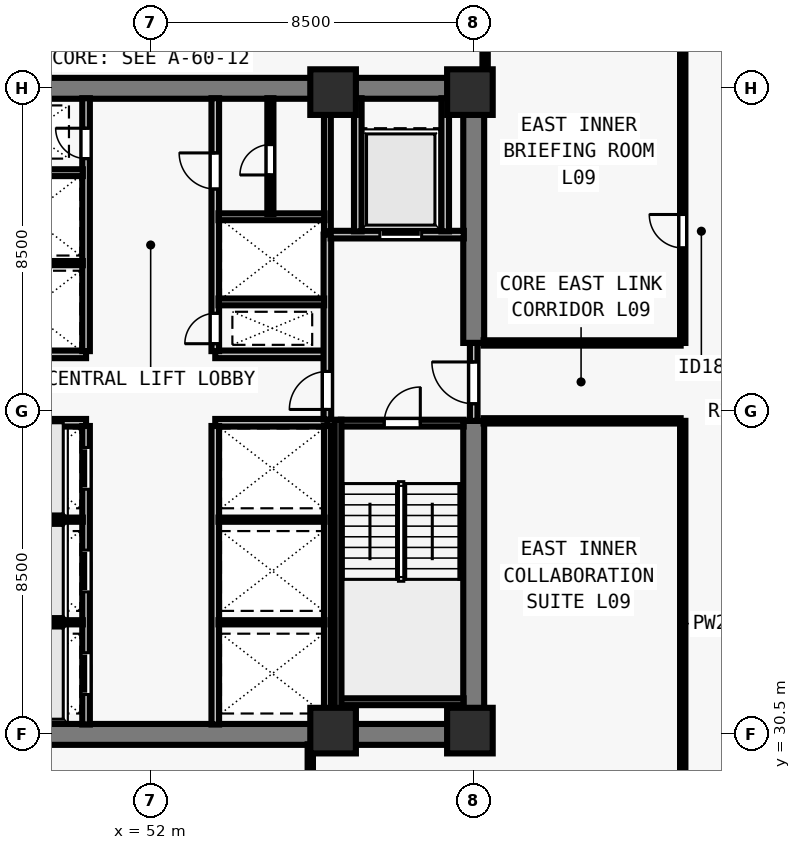
"""IFC4 building model, lengths in metres.
Left out: names, types, materials, properties, quantities, classifications, styles, units other than length and angle.
Written with IfcOpenShell. Run it as: python <this file> out.ifc"""

import sys

from ifc_helpers import new_model, si_unit, direction, frame, frame_2d, origin, origin_2d, place, context, subcontext, project, spatial, rectangle, extrude, element, fill, save


model = new_model("IFC4")
c1 = context("Model", 3, precision=1e-05, world=origin(), true_north=direction((0.0, 1.0)))
c2 = subcontext(c1, "Body", "Model", "MODEL_VIEW")
j1 = project(units=[si_unit("LENGTHUNIT", "METRE"), si_unit("PLANEANGLEUNIT", "RADIAN")], contexts=[c1])
p1 = place(None, origin())
s1 = spatial("IfcSite", under=j1, at=p1, CompositionType="ELEMENT")
p2 = place(p1, origin())
s2 = spatial("IfcBuilding", under=s1, at=p2, CompositionType="ELEMENT")
p3 = place(p2, frame((0.0, 0.0, 37.5)))
s3 = spatial("IfcBuildingStorey", under=s2, at=p3, CompositionType="ELEMENT", Elevation=37.5)
for number, where, z_axis, x_axis in (
    (1, (56.8, 30.6, 0.0), (0.0, 0.0, 1.0), (1.0, 0.0, 0.0)),
    (2, (60.4, 30.6, 0.0), (0.0, 0.0, 1.0), (1.0, 0.0, 0.0)),
    (3, (56.8, 47.4, 0.0), (0.0, 0.0, 1.0), (1.0, 0.0, 0.0)),
    (4, (60.4, 47.4, 0.0), (0.0, 0.0, 1.0), (1.0, 0.0, 0.0)),
):
    element("IfcColumn", number, at=place(p3, frame(where, z_axis=z_axis, x_axis=x_axis)), inside=s3, PredefinedType="COLUMN", context=c2, shape_type="SweptSolid", body=[
        extrude(rectangle(XDim=1.2, YDim=1.2, at=origin_2d()), origin(), (0.0, 0.0, 1.0), 3.5),
    ])
for number, where, z_axis, x_axis in (
    (5, (43.225, 30.5, 0.0), (0.0, 0.0, 1.0), (1.0, 0.0, 0.0)),
    (6, (43.225, 47.5, 0.0), (0.0, 0.0, 1.0), (1.0, 0.0, 0.0)),
):
    element("IfcWall", number, at=place(p3, frame(where, z_axis=z_axis, x_axis=x_axis)), inside=s3, PredefinedType="SHEAR", context=c2, shape_type="SweptSolid", body=[
        extrude(rectangle(XDim=17.55, YDim=0.55, at=frame_2d((8.775, 0.0))), origin(), (0.0, 0.0, 1.0), 3.28),
    ])
p4 = place(p3, frame((60.5, 30.765, 0.0), z_axis=(0.0, 0.0, 1.0), x_axis=(0.0, 1.0, 0.0)))
e7 = element("IfcWall", 7, at=p4, inside=s3, PredefinedType="SHEAR", context=c2, shape_type="SweptSolid", body=[
    extrude(rectangle(XDim=7.985, YDim=0.55, at=frame_2d((3.993, 0.0))), origin(), (0.0, 0.0, 1.0), 3.28),
])
p5 = place(p3, frame((60.5, 40.8, 0.0), z_axis=(0.0, 0.0, 1.0), x_axis=(0.0, 1.0, 0.0)))
e8 = element("IfcWall", 8, at=p5, inside=s3, PredefinedType="SHEAR", context=c2, shape_type="SweptSolid", body=[
    extrude(rectangle(XDim=6.435, YDim=0.55, at=frame_2d((3.218, 0.0))), origin(), (0.0, 0.0, 1.0), 3.28),
])
for number, where, z_axis, x_axis in (
    (9, (47.35, 38.7, 0.0), (0.0, 0.0, 1.0), (1.0, 0.0, 0.0)),
    (10, (47.35, 40.5, 0.0), (0.0, 0.0, 1.0), (1.0, 0.0, 0.0)),
    (11, (53.7, 38.7, 0.0), (0.0, 0.0, 1.0), (1.0, 0.0, 0.0)),
    (12, (53.7, 40.5, 0.0), (0.0, 0.0, 1.0), (1.0, 0.0, 0.0)),
):
    element("IfcWall", number, at=place(p3, frame(where, z_axis=z_axis, x_axis=x_axis)), inside=s3, PredefinedType="SOLIDWALL", context=c2, shape_type="SweptSolid", body=[
        extrude(rectangle(XDim=2.95, YDim=0.2, at=frame_2d((1.475, 0.0))), origin(), (0.0, 0.0, 1.0), 3.28),
    ])
p6 = place(p3, frame((50.3, 30.76, 0.0), z_axis=(0.0, 0.0, 1.0), x_axis=(0.0, 1.0, 0.0)))
e13 = element("IfcWall", 13, at=p6, inside=s3, PredefinedType="SOLIDWALL", context=c2, shape_type="SweptSolid", body=[
    extrude(rectangle(XDim=7.855, YDim=0.2, at=frame_2d((3.927, 0.0))), origin(), (0.0, 0.0, 1.0), 3.28),
])
p7 = place(p6, frame((0.79, 0.0, 0.0)))
e14 = element("IfcOpeningElement", 14, at=p7, cuts=e13, PredefinedType="OPENING", context=c2, shape_type="SweptSolid", body=[
    extrude(rectangle(XDim=1.1, YDim=2.2, at=frame_2d((0.55, 1.1))), frame((0.0, 0.11, 0.0), z_axis=(0.0, -1.0, 0.0), x_axis=(1.0, 0.0, 0.0)), (0.0, 0.0, 1.0), 0.22),
])
p8 = place(p6, frame((3.49, 0.0, 0.0)))
e15 = element("IfcOpeningElement", 15, at=p8, cuts=e13, PredefinedType="OPENING", context=c2, shape_type="SweptSolid", body=[
    extrude(rectangle(XDim=1.1, YDim=2.2, at=frame_2d((0.55, 1.1))), frame((0.0, 0.11, 0.0), z_axis=(0.0, -1.0, 0.0), x_axis=(1.0, 0.0, 0.0)), (0.0, 0.0, 1.0), 0.22),
])
p9 = place(p6, frame((6.19, 0.0, 0.0)))
e16 = element("IfcOpeningElement", 16, at=p9, cuts=e13, PredefinedType="OPENING", context=c2, shape_type="SweptSolid", body=[
    extrude(rectangle(XDim=1.1, YDim=2.2, at=frame_2d((0.55, 1.1))), frame((0.0, 0.11, 0.0), z_axis=(0.0, -1.0, 0.0), x_axis=(1.0, 0.0, 0.0)), (0.0, 0.0, 1.0), 0.22),
])
p10 = place(p3, frame((53.7, 30.76, 0.0), z_axis=(0.0, 0.0, 1.0), x_axis=(0.0, 1.0, 0.0)))
e17 = element("IfcWall", 17, at=p10, inside=s3, PredefinedType="SOLIDWALL", context=c2, shape_type="SweptSolid", body=[
    extrude(rectangle(XDim=7.855, YDim=0.2, at=frame_2d((3.927, 0.0))), origin(), (0.0, 0.0, 1.0), 3.28),
])
p11 = place(p3, frame((50.3, 40.585, 0.0), z_axis=(0.0, 0.0, 1.0), x_axis=(0.0, 1.0, 0.0)))
e18 = element("IfcWall", 18, at=p11, inside=s3, PredefinedType="SOLIDWALL", context=c2, shape_type="SweptSolid", body=[
    extrude(rectangle(XDim=6.655, YDim=0.2, at=frame_2d((3.328, 0.0))), origin(), (0.0, 0.0, 1.0), 3.28),
])
p12 = place(p11, frame((5.065, 0.0, 0.0)))
e19 = element("IfcOpeningElement", 19, at=p12, cuts=e18, PredefinedType="OPENING", context=c2, shape_type="SweptSolid", body=[
    extrude(rectangle(XDim=0.8, YDim=2.08, at=frame_2d((0.4, 1.04))), frame((0.0, 0.11, 0.0), z_axis=(0.0, -1.0, 0.0), x_axis=(1.0, 0.0, 0.0)), (0.0, 0.0, 1.0), 0.22),
])
p13 = place(p3, frame((53.7, 40.585, 0.0), z_axis=(0.0, 0.0, 1.0), x_axis=(0.0, 1.0, 0.0)))
e20 = element("IfcWall", 20, at=p13, inside=s3, PredefinedType="SOLIDWALL", context=c2, shape_type="SweptSolid", body=[
    extrude(rectangle(XDim=6.655, YDim=0.2, at=frame_2d((3.328, 0.0))), origin(), (0.0, 0.0, 1.0), 3.28),
])
p14 = place(p13, frame((0.195, 0.0, 0.0)))
e21 = element("IfcOpeningElement", 21, at=p14, cuts=e20, PredefinedType="OPENING", context=c2, shape_type="SweptSolid", body=[
    extrude(rectangle(XDim=0.8, YDim=2.08, at=frame_2d((0.4, 1.04))), frame((0.0, 0.11, 0.0), z_axis=(0.0, -1.0, 0.0), x_axis=(1.0, 0.0, 0.0)), (0.0, 0.0, 1.0), 0.22),
])
p15 = place(p13, frame((4.265, 0.0, 0.0)))
e22 = element("IfcOpeningElement", 22, at=p15, cuts=e20, PredefinedType="OPENING", context=c2, shape_type="SweptSolid", body=[
    extrude(rectangle(XDim=0.95, YDim=2.12, at=frame_2d((0.475, 1.06))), frame((0.0, 0.11, 0.0), z_axis=(0.0, -1.0, 0.0), x_axis=(1.0, 0.0, 0.0)), (0.0, 0.0, 1.0), 0.22),
])
p16 = place(p3, frame((60.5, 38.75, 0.0), z_axis=(0.0, 0.0, 1.0), x_axis=(0.0, 1.0, 0.0)))
e23 = element("IfcWall", 23, at=p16, inside=s3, PredefinedType="SOLIDWALL", context=c2, shape_type="SweptSolid", body=[
    extrude(rectangle(XDim=2.05, YDim=0.2, at=frame_2d((1.025, 0.0))), origin(), (0.0, 0.0, 1.0), 3.28),
])
p17 = place(p16, frame((0.45, 0.0, 0.0)))
e24 = element("IfcOpeningElement", 24, at=p17, cuts=e23, PredefinedType="OPENING", context=c2, shape_type="SweptSolid", body=[
    extrude(rectangle(XDim=1.1, YDim=2.15, at=frame_2d((0.55, 1.075))), frame((0.0, 0.11, 0.0), z_axis=(0.0, -1.0, 0.0), x_axis=(1.0, 0.0, 0.0)), (0.0, 0.0, 1.0), 0.22),
])
p18 = place(p3, frame((56.65, 38.785, 0.0), z_axis=(0.0, 0.0, 1.0), x_axis=(0.0, 1.0, 0.0)))
e25 = element("IfcWall", 25, at=p18, inside=s3, PredefinedType="SOLIDWALL", context=c2, shape_type="SweptSolid", body=[
    extrude(rectangle(XDim=4.865, YDim=0.2, at=frame_2d((2.433, 0.0))), origin(), (0.0, 0.0, 1.0), 3.28),
])
p19 = place(p18, frame((0.265, 0.0, 0.0)))
e26 = element("IfcOpeningElement", 26, at=p19, cuts=e25, PredefinedType="OPENING", context=c2, shape_type="SweptSolid", body=[
    extrude(rectangle(XDim=1.0, YDim=2.15, at=frame_2d((0.5, 1.075))), frame((0.0, 0.11, 0.0), z_axis=(0.0, -1.0, 0.0), x_axis=(1.0, 0.0, 0.0)), (0.0, 0.0, 1.0), 0.22),
])
p20 = place(p3, frame((56.735, 43.65, 0.0), z_axis=(0.0, 0.0, 1.0), x_axis=(1.0, 0.0, 0.0)))
e27 = element("IfcWall", 27, at=p20, inside=s3, PredefinedType="SOLIDWALL", context=c2, shape_type="SweptSolid", body=[
    extrude(rectangle(XDim=3.505, YDim=0.2, at=frame_2d((1.752, 0.0))), origin(), (0.0, 0.0, 1.0), 3.28),
])
p21 = place(p20, frame((1.295, 0.0, 0.0)))
e28 = element("IfcOpeningElement", 28, at=p21, cuts=e27, PredefinedType="OPENING", context=c2, shape_type="SweptSolid", body=[
    extrude(rectangle(XDim=1.1, YDim=2.2, at=frame_2d((0.55, 1.1))), frame((0.0, 0.11, 0.0), z_axis=(0.0, -1.0, 0.0), x_axis=(1.0, 0.0, 0.0)), (0.0, 0.0, 1.0), 0.22),
])
for number, where, z_axis, x_axis in (
    (29, (57.45, 43.735, 0.0), (0.0, 0.0, 1.0), (0.0, 1.0, 0.0)),
    (30, (59.75, 43.735, 0.0), (0.0, 0.0, 1.0), (0.0, 1.0, 0.0)),
):
    element("IfcWall", number, at=place(p3, frame(where, z_axis=z_axis, x_axis=x_axis)), inside=s3, PredefinedType="SOLIDWALL", context=c2, shape_type="SweptSolid", body=[
        extrude(rectangle(XDim=3.505, YDim=0.2, at=frame_2d((1.752, 0.0))), origin(), (0.0, 0.0, 1.0), 3.28),
    ])
for number, where, z_axis, x_axis in (
    (31, (47.425, 33.45, 0.0), (0.0, 0.0, 1.0), (1.0, 0.0, 0.0)),
    (32, (47.425, 36.15, 0.0), (0.0, 0.0, 1.0), (1.0, 0.0, 0.0)),
):
    element("IfcWall", number, at=place(p3, frame(where, z_axis=z_axis, x_axis=x_axis)), inside=s3, PredefinedType="PARTITIONING", context=c2, shape_type="SweptSolid", body=[
        extrude(rectangle(XDim=2.79, YDim=0.11, at=frame_2d((1.395, 0.0))), origin(), (0.0, 0.0, 1.0), 3.28),
    ])
p22 = place(p3, frame((56.65, 30.76, 0.0), z_axis=(0.0, 0.0, 1.0), x_axis=(0.0, 1.0, 0.0)))
e33 = element("IfcWall", 33, at=p22, inside=s3, PredefinedType="SOLIDWALL", context=c2, shape_type="SweptSolid", body=[
    extrude(rectangle(XDim=7.855, YDim=0.18, at=frame_2d((3.927, 0.0))), origin(), (0.0, 0.0, 1.0), 3.28),
])
for number, where, z_axis, x_axis in (
    (34, (53.785, 33.45, 0.0), (0.0, 0.0, 1.0), (1.0, 0.0, 0.0)),
    (35, (53.785, 36.15, 0.0), (0.0, 0.0, 1.0), (1.0, 0.0, 0.0)),
):
    element("IfcWall", number, at=place(p3, frame(where, z_axis=z_axis, x_axis=x_axis)), inside=s3, PredefinedType="PARTITIONING", context=c2, shape_type="SweptSolid", body=[
        extrude(rectangle(XDim=2.79, YDim=0.11, at=frame_2d((1.395, 0.0))), origin(), (0.0, 0.0, 1.0), 3.28),
    ])
p23 = place(p3, frame((47.435, 42.9, 0.0), z_axis=(0.0, 0.0, 1.0), x_axis=(1.0, 0.0, 0.0)))
e36 = element("IfcWall", 36, at=p23, inside=s3, PredefinedType="PARTITIONING", context=c2, shape_type="SweptSolid", body=[
    extrude(rectangle(XDim=2.78, YDim=0.11, at=frame_2d((1.39, 0.0))), origin(), (0.0, 0.0, 1.0), 3.28),
])
p24 = place(p3, frame((47.425, 45.28, 0.0), z_axis=(0.0, 0.0, 1.0), x_axis=(1.0, 0.0, 0.0)))
e37 = element("IfcWall", 37, at=p24, inside=s3, PredefinedType="SOLIDWALL", context=c2, shape_type="SweptSolid", body=[
    extrude(rectangle(XDim=2.79, YDim=0.18, at=frame_2d((1.395, 0.0))), origin(), (0.0, 0.0, 1.0), 3.28),
])
p25 = place(p3, frame((56.65, 43.735, 0.0), z_axis=(0.0, 0.0, 1.0), x_axis=(0.0, 1.0, 0.0)))
e38 = element("IfcWall", 38, at=p25, inside=s3, PredefinedType="SOLIDWALL", context=c2, shape_type="SweptSolid", body=[
    extrude(rectangle(XDim=3.505, YDim=0.18, at=frame_2d((1.752, 0.0))), origin(), (0.0, 0.0, 1.0), 3.28),
])
p26 = place(p3, frame((53.785, 41.88, 0.0), z_axis=(0.0, 0.0, 1.0), x_axis=(1.0, 0.0, 0.0)))
e39 = element("IfcWall", 39, at=p26, inside=s3, PredefinedType="SOLIDWALL", context=c2, shape_type="SweptSolid", body=[
    extrude(rectangle(XDim=2.78, YDim=0.18, at=frame_2d((1.39, 0.0))), origin(), (0.0, 0.0, 1.0), 3.28),
])
p27 = place(p3, frame((53.785, 44.12, 0.0), z_axis=(0.0, 0.0, 1.0), x_axis=(1.0, 0.0, 0.0)))
e40 = element("IfcWall", 40, at=p27, inside=s3, PredefinedType="SOLIDWALL", context=c2, shape_type="SweptSolid", body=[
    extrude(rectangle(XDim=2.79, YDim=0.18, at=frame_2d((1.395, 0.0))), origin(), (0.0, 0.0, 1.0), 3.28),
])
p28 = place(p3, frame((55.15, 44.195, 0.0), z_axis=(0.0, 0.0, 1.0), x_axis=(0.0, 1.0, 0.0)))
e41 = element("IfcWall", 41, at=p28, inside=s3, PredefinedType="PARTITIONING", context=c2, shape_type="SweptSolid", body=[
    extrude(rectangle(XDim=3.045, YDim=0.16, at=frame_2d((1.522, 0.0))), origin(), (0.0, 0.0, 1.0), 3.28),
])
p29 = place(p28, frame((1.025, 0.0, 0.0)))
e42 = element("IfcOpeningElement", 42, at=p29, cuts=e41, PredefinedType="OPENING", context=c2, shape_type="SweptSolid", body=[
    extrude(rectangle(XDim=0.8, YDim=2.1, at=frame_2d((0.4, 1.05))), frame((0.0, 0.09, 0.0), z_axis=(0.0, -1.0, 0.0), x_axis=(1.0, 0.0, 0.0)), (0.0, 0.0, 1.0), 0.18),
])
p30 = place(p3, frame((66.0, 24.605, 0.0), z_axis=(0.0, 0.0, 1.0), x_axis=(0.0, 1.0, 0.0)))
e43 = element("IfcWall", 43, at=p30, inside=s3, PredefinedType="PARTITIONING", context=c2, shape_type="SweptSolid", body=[
    extrude(rectangle(XDim=14.145, YDim=0.14, at=frame_2d((7.073, 0.0))), origin(), (0.0, 0.0, 1.0), 3.28),
])
p31 = place(p30, frame((2.445, 0.0, 0.0)))
e44 = element("IfcOpeningElement", 44, at=p31, cuts=e43, PredefinedType="OPENING", context=c2, shape_type="SweptSolid", body=[
    extrude(rectangle(XDim=0.88, YDim=2.1, at=frame_2d((0.44, 1.05))), frame((0.0, 0.08, 0.0), z_axis=(0.0, -1.0, 0.0), x_axis=(1.0, 0.0, 0.0)), (0.0, 0.0, 1.0), 0.16),
])
p32 = place(p3, frame((66.0, 40.8, 0.0), z_axis=(0.0, 0.0, 1.0), x_axis=(0.0, 1.0, 0.0)))
e45 = element("IfcWall", 45, at=p32, inside=s3, PredefinedType="PARTITIONING", context=c2, shape_type="SweptSolid", body=[
    extrude(rectangle(XDim=12.595, YDim=0.14, at=frame_2d((6.297, 0.0))), origin(), (0.0, 0.0, 1.0), 3.28),
])
p33 = place(p32, frame((2.5, 0.0, 0.0)))
e46 = element("IfcOpeningElement", 46, at=p33, cuts=e45, PredefinedType="OPENING", context=c2, shape_type="SweptSolid", body=[
    extrude(rectangle(XDim=0.88, YDim=2.1, at=frame_2d((0.44, 1.05))), frame((0.0, 0.08, 0.0), z_axis=(0.0, -1.0, 0.0), x_axis=(1.0, 0.0, 0.0)), (0.0, 0.0, 1.0), 0.16),
])
for number, where, z_axis, x_axis in (
    (47, (60.76, 38.75, 0.0), (0.0, 0.0, 1.0), (1.0, 0.0, 0.0)),
    (48, (60.76, 40.8, 0.0), (0.0, 0.0, 1.0), (1.0, 0.0, 0.0)),
):
    element("IfcWall", number, at=place(p3, frame(where, z_axis=z_axis, x_axis=x_axis)), inside=s3, PredefinedType="PARTITIONING", context=c2, shape_type="SweptSolid", body=[
        extrude(rectangle(XDim=5.185, YDim=0.14, at=frame_2d((2.593, 0.0))), origin(), (0.0, 0.0, 1.0), 3.28),
    ])
p34 = place(p3, frame((56.2, 24.605, 0.0), z_axis=(0.0, 0.0, 1.0), x_axis=(0.0, 1.0, 0.0)))
e49 = element("IfcWall", 49, at=p34, inside=s3, PredefinedType="PARTITIONING", context=c2, shape_type="SweptSolid", body=[
    extrude(rectangle(XDim=5.635, YDim=0.14, at=frame_2d((2.817, 0.0))), origin(), (0.0, 0.0, 1.0), 2.849),
])
p35 = place(p3, frame((60.8, 47.76, 0.0), z_axis=(0.0, 0.0, 1.0), x_axis=(0.0, 1.0, 0.0)))
e50 = element("IfcWall", 50, at=p35, inside=s3, PredefinedType="PARTITIONING", context=c2, shape_type="SweptSolid", body=[
    extrude(rectangle(XDim=5.635, YDim=0.14, at=frame_2d((2.817, 0.0))), origin(), (0.0, 0.0, 1.0), 2.439),
])
p36 = place(p3, frame((57.005, 38.69, 0.0), z_axis=(0.0, 0.0, 1.0), x_axis=(1.0, 0.0, 0.0)))
e51 = element("IfcWall", 51, at=p36, inside=s3, PredefinedType="SOLIDWALL", context=c2, shape_type="SweptSolid", body=[
    extrude(rectangle(XDim=3.23, YDim=0.18, at=frame_2d((1.615, 0.0))), origin(), (0.0, 0.0, 1.0), 3.28),
])
p37 = place(p36, frame((1.14, 0.0, 0.0)))
e52 = element("IfcOpeningElement", 52, at=p37, cuts=e51, PredefinedType="OPENING", context=c2, shape_type="SweptSolid", body=[
    extrude(rectangle(XDim=0.95, YDim=2.15, at=frame_2d((0.475, 1.075))), frame((0.0, 0.1, 0.0), z_axis=(0.0, -1.0, 0.0), x_axis=(1.0, 0.0, 0.0)), (0.0, 0.0, 1.0), 0.2),
])
p38 = place(p3, frame((57.005, 31.36, 0.0), z_axis=(0.0, 0.0, 1.0), x_axis=(1.0, 0.0, 0.0)))
e53 = element("IfcWall", 53, at=p38, inside=s3, PredefinedType="SOLIDWALL", context=c2, shape_type="SweptSolid", body=[
    extrude(rectangle(XDim=3.23, YDim=0.18, at=frame_2d((1.615, 0.0))), origin(), (0.0, 0.0, 1.0), 3.28),
])
p39 = place(p3, frame((56.93, 38.78, 0.0), z_axis=(0.0, 0.0, 1.0), x_axis=(0.0, -1.0, 0.0)))
e54 = element("IfcWall", 54, at=p39, inside=s3, PredefinedType="SOLIDWALL", context=c2, shape_type="SweptSolid", body=[
    extrude(rectangle(XDim=8.017, YDim=0.18, at=frame_2d((4.009, 0.0))), origin(), (0.0, 0.0, 1.0), 3.28),
])
p40 = place(p17, origin())
e55 = element("IfcDoor", 55, at=p40, inside=s3, OperationType="SINGLE_SWING_RIGHT", PredefinedType="DOOR", context=c2, shape_type="SweptSolid", body=[
    extrude(rectangle(XDim=1.1, YDim=2.15, at=frame_2d((0.55, 1.075))), frame((0.0, 0.025, 0.0), z_axis=(0.0, -1.0, 0.0), x_axis=(1.0, 0.0, 0.0)), (0.0, 0.0, 1.0), 0.05),
])
fill(e24, e55)
p41 = place(p19, origin())
e56 = element("IfcDoor", 56, at=p41, inside=s3, OperationType="SINGLE_SWING_LEFT", PredefinedType="DOOR", context=c2, shape_type="SweptSolid", body=[
    extrude(rectangle(XDim=1.0, YDim=2.15, at=frame_2d((0.5, 1.075))), frame((0.0, 0.025, 0.0), z_axis=(0.0, -1.0, 0.0), x_axis=(1.0, 0.0, 0.0)), (0.0, 0.0, 1.0), 0.05),
])
fill(e26, e56)
p42 = place(p21, origin())
e57 = element("IfcDoor", 57, at=p42, inside=s3, OperationType="SLIDING_TO_LEFT", PredefinedType="DOOR", context=c2, shape_type="SweptSolid", body=[
    extrude(rectangle(XDim=1.1, YDim=2.2, at=frame_2d((0.55, 1.1))), frame((0.0, 0.025, 0.0), z_axis=(0.0, -1.0, 0.0), x_axis=(1.0, 0.0, 0.0)), (0.0, 0.0, 1.0), 0.05),
])
fill(e28, e57)
p43 = place(p7, origin())
e58 = element("IfcDoor", 58, at=p43, inside=s3, OperationType="SLIDING_TO_LEFT", PredefinedType="DOOR", context=c2, shape_type="SweptSolid", body=[
    extrude(rectangle(XDim=1.1, YDim=2.2, at=frame_2d((0.55, 1.1))), frame((0.0, 0.025, 0.0), z_axis=(0.0, -1.0, 0.0), x_axis=(1.0, 0.0, 0.0)), (0.0, 0.0, 1.0), 0.05),
])
fill(e14, e58)
p44 = place(p8, origin())
e59 = element("IfcDoor", 59, at=p44, inside=s3, OperationType="SLIDING_TO_LEFT", PredefinedType="DOOR", context=c2, shape_type="SweptSolid", body=[
    extrude(rectangle(XDim=1.1, YDim=2.2, at=frame_2d((0.55, 1.1))), frame((0.0, 0.025, 0.0), z_axis=(0.0, -1.0, 0.0), x_axis=(1.0, 0.0, 0.0)), (0.0, 0.0, 1.0), 0.05),
])
fill(e15, e59)
p45 = place(p9, origin())
e60 = element("IfcDoor", 60, at=p45, inside=s3, OperationType="SLIDING_TO_LEFT", PredefinedType="DOOR", context=c2, shape_type="SweptSolid", body=[
    extrude(rectangle(XDim=1.1, YDim=2.2, at=frame_2d((0.55, 1.1))), frame((0.0, 0.025, 0.0), z_axis=(0.0, -1.0, 0.0), x_axis=(1.0, 0.0, 0.0)), (0.0, 0.0, 1.0), 0.05),
])
fill(e16, e60)
p46 = place(p12, origin())
e61 = element("IfcDoor", 61, at=p46, inside=s3, OperationType="SINGLE_SWING_RIGHT", PredefinedType="DOOR", context=c2, shape_type="SweptSolid", body=[
    extrude(rectangle(XDim=0.8, YDim=2.08, at=frame_2d((0.4, 1.04))), frame((0.0, 0.025, 0.0), z_axis=(0.0, -1.0, 0.0), x_axis=(1.0, 0.0, 0.0)), (0.0, 0.0, 1.0), 0.05),
])
fill(e19, e61)
p47 = place(p14, origin())
e62 = element("IfcDoor", 62, at=p47, inside=s3, OperationType="SINGLE_SWING_LEFT", PredefinedType="DOOR", context=c2, shape_type="SweptSolid", body=[
    extrude(rectangle(XDim=0.8, YDim=2.08, at=frame_2d((0.4, 1.04))), frame((0.0, 0.025, 0.0), z_axis=(0.0, -1.0, 0.0), x_axis=(1.0, 0.0, 0.0)), (0.0, 0.0, 1.0), 0.05),
])
fill(e21, e62)
p48 = place(p15, origin())
e63 = element("IfcDoor", 63, at=p48, inside=s3, OperationType="SINGLE_SWING_RIGHT", PredefinedType="DOOR", context=c2, shape_type="SweptSolid", body=[
    extrude(rectangle(XDim=0.95, YDim=2.12, at=frame_2d((0.475, 1.06))), frame((0.0, 0.025, 0.0), z_axis=(0.0, -1.0, 0.0), x_axis=(1.0, 0.0, 0.0)), (0.0, 0.0, 1.0), 0.05),
])
fill(e22, e63)
p49 = place(p29, origin())
e64 = element("IfcDoor", 64, at=p49, inside=s3, OperationType="SINGLE_SWING_LEFT", PredefinedType="DOOR", context=c2, shape_type="SweptSolid", body=[
    extrude(rectangle(XDim=0.8, YDim=2.1, at=frame_2d((0.4, 1.05))), frame((0.0, 0.025, 0.0), z_axis=(0.0, -1.0, 0.0), x_axis=(1.0, 0.0, 0.0)), (0.0, 0.0, 1.0), 0.05),
])
fill(e42, e64)
p50 = place(p33, origin())
e65 = element("IfcDoor", 65, at=p50, inside=s3, OperationType="SINGLE_SWING_RIGHT", PredefinedType="DOOR", context=c2, shape_type="SweptSolid", body=[
    extrude(rectangle(XDim=0.88, YDim=2.1, at=frame_2d((0.44, 1.05))), frame((0.0, 0.025, 0.0), z_axis=(0.0, -1.0, 0.0), x_axis=(1.0, 0.0, 0.0)), (0.0, 0.0, 1.0), 0.05),
])
fill(e46, e65)
p51 = place(p37, origin())
e66 = element("IfcDoor", 66, at=p51, inside=s3, OperationType="SINGLE_SWING_RIGHT", PredefinedType="DOOR", context=c2, shape_type="SweptSolid", body=[
    extrude(rectangle(XDim=0.95, YDim=2.15, at=frame_2d((0.475, 1.075))), frame((0.0, 0.025, 0.0), z_axis=(0.0, -1.0, 0.0), x_axis=(1.0, 0.0, 0.0)), (0.0, 0.0, 1.0), 0.05),
])
fill(e52, e66)
save(model, sys.argv[1])
